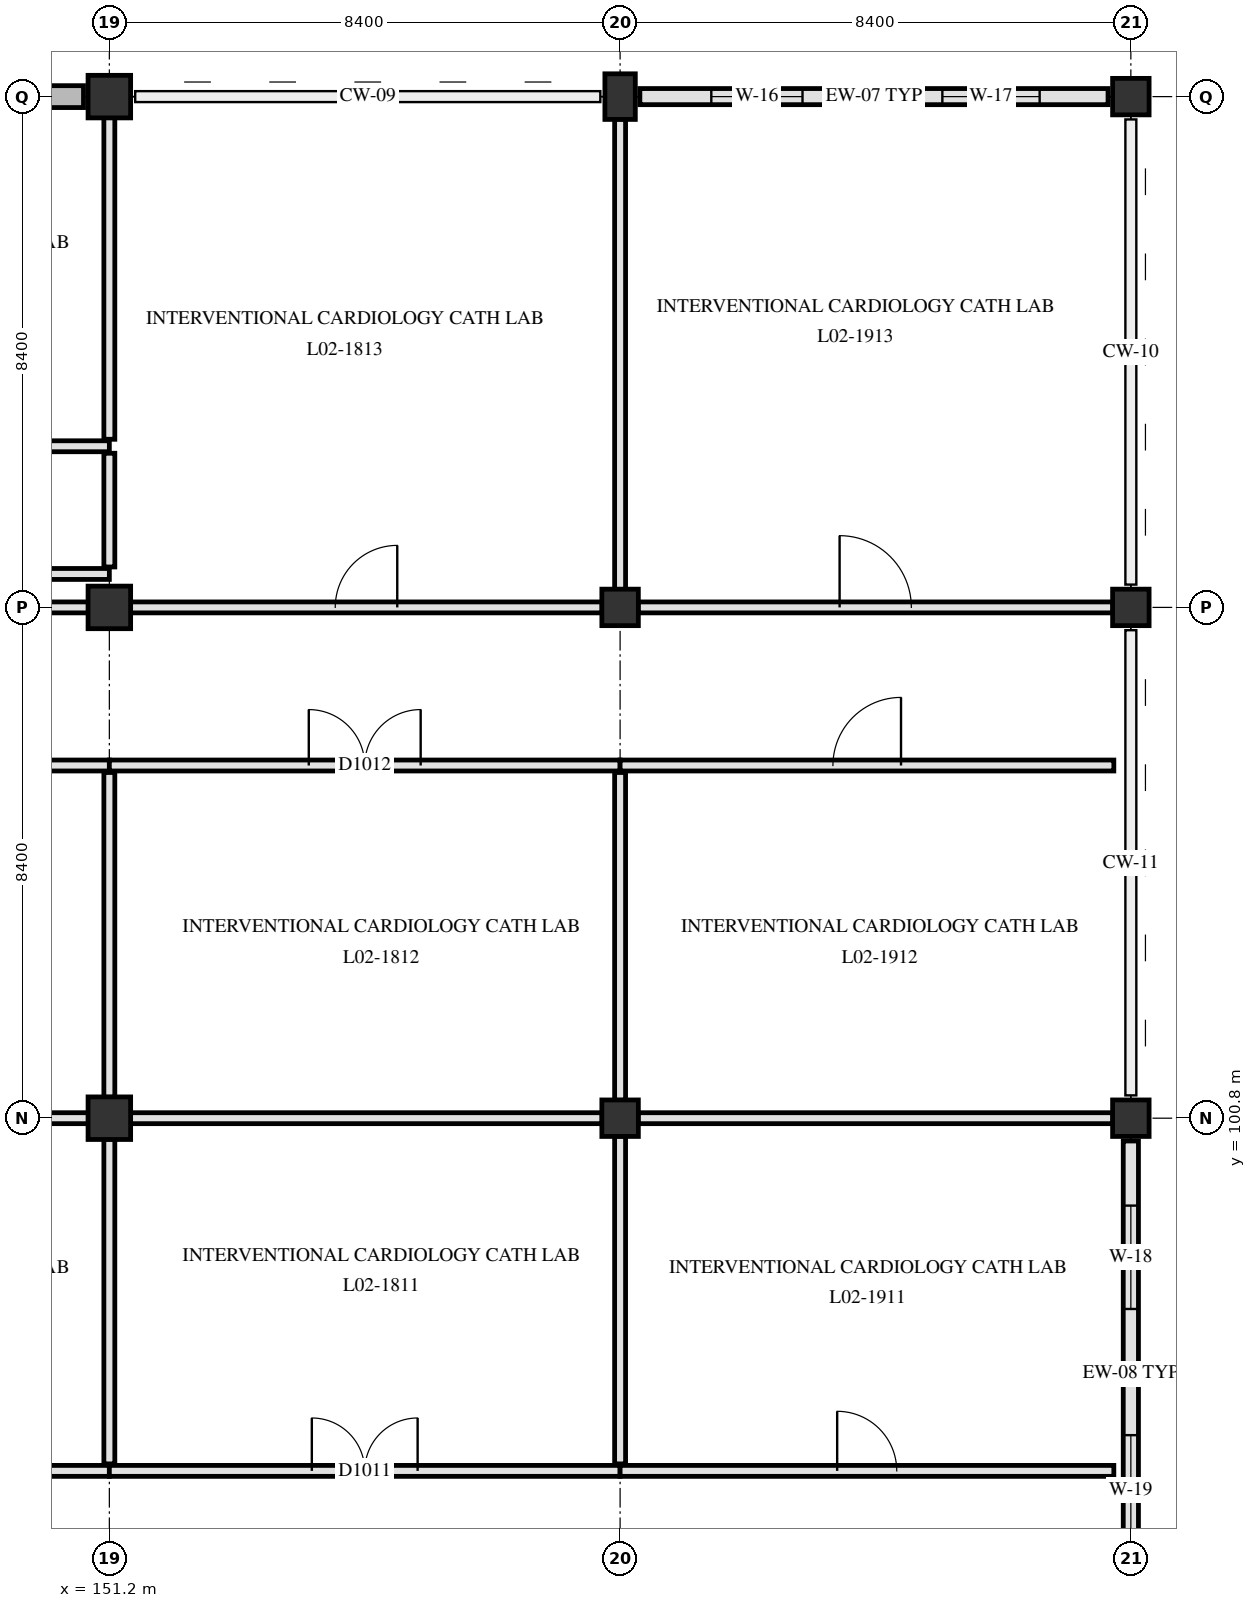
"""IFC4 building model, lengths in metres.
Left out: names, types, materials, properties, quantities, classifications, styles, units other than length and angle.
Written with IfcOpenShell. Run it as: python <this file> out.ifc"""

import sys

from ifc_helpers import new_model, si_unit, direction, frame, frame_2d, origin, origin_2d, place, context, subcontext, project, spatial, rectangle, extrude, element, fill, save


model = new_model("IFC4")
c1 = context("Model", 3, precision=1e-05, world=origin(), true_north=direction((0.0, 1.0)))
c2 = subcontext(c1, "Body", "Model", "MODEL_VIEW")
j1 = project(units=[si_unit("LENGTHUNIT", "METRE"), si_unit("PLANEANGLEUNIT", "RADIAN")], contexts=[c1])
p1 = place(None, origin())
s1 = spatial("IfcSite", under=j1, at=p1, CompositionType="ELEMENT")
p2 = place(p1, origin())
s2 = spatial("IfcBuilding", under=s1, at=p2, CompositionType="ELEMENT")
p3 = place(p2, frame((0.0, 0.0, 9.3)))
s3 = spatial("IfcBuildingStorey", under=s2, at=p3, CompositionType="ELEMENT", Elevation=9.3)
for number, where, z_axis, x_axis in (
    (1, (151.2, 100.8, 0.0), (0.0, 0.0, 1.0), (1.0, 0.0, 0.0)),
    (2, (151.2, 109.2, 0.0), (0.0, 0.0, 1.0), (1.0, 0.0, 0.0)),
    (3, (151.2, 117.6, 0.0), (0.0, 0.0, 1.0), (1.0, 0.0, 0.0)),
):
    element("IfcColumn", number, at=place(p3, frame(where, z_axis=z_axis, x_axis=x_axis)), inside=s3, PredefinedType="COLUMN", context=c2, shape_type="SweptSolid", body=[
        extrude(rectangle(XDim=0.7, YDim=0.7, at=origin_2d()), origin(), (0.0, 0.0, 1.0), 5.1),
    ])
for number, where, z_axis, x_axis in (
    (4, (159.6, 100.8, 0.0), (0.0, 0.0, 1.0), (1.0, 0.0, 0.0)),
    (5, (159.6, 109.2, 0.0), (0.0, 0.0, 1.0), (1.0, 0.0, 0.0)),
):
    element("IfcColumn", number, at=place(p3, frame(where, z_axis=z_axis, x_axis=x_axis)), inside=s3, PredefinedType="COLUMN", context=c2, shape_type="SweptSolid", body=[
        extrude(rectangle(XDim=0.6, YDim=0.6, at=origin_2d()), origin(), (0.0, 0.0, 1.0), 5.1),
    ])
p4 = place(p3, frame((159.6, 117.6, 0.0), z_axis=(0.0, 0.0, 1.0), x_axis=(1.0, 0.0, 0.0)))
e6 = element("IfcColumn", 6, at=p4, inside=s3, PredefinedType="PILASTER", context=c2, shape_type="SweptSolid", body=[
    extrude(rectangle(XDim=0.5, YDim=0.75, at=origin_2d()), origin(), (0.0, 0.0, 1.0), 5.1),
])
for number, where, z_axis, x_axis in (
    (7, (168.0, 100.8, 0.0), (0.0, 0.0, 1.0), (1.0, 0.0, 0.0)),
    (8, (168.0, 109.2, 0.0), (0.0, 0.0, 1.0), (1.0, 0.0, 0.0)),
    (9, (168.0, 117.6, 0.0), (0.0, 0.0, 1.0), (1.0, 0.0, 0.0)),
):
    element("IfcColumn", number, at=place(p3, frame(where, z_axis=z_axis, x_axis=x_axis)), inside=s3, PredefinedType="COLUMN", context=c2, shape_type="SweptSolid", body=[
        extrude(rectangle(XDim=0.6, YDim=0.6, at=origin_2d()), origin(), (0.0, 0.0, 1.0), 5.1),
    ])
p5 = place(p3, frame((143.225, 117.6, 0.0), z_axis=(0.0, 0.0, 1.0), x_axis=(1.0, 0.0, 0.0)))
e10 = element("IfcWall", 10, at=p5, inside=s3, PredefinedType="SOLIDWALL", context=c2, shape_type="SweptSolid", body=[
    extrude(rectangle(XDim=7.55, YDim=0.36, at=frame_2d((3.775, 0.0))), origin(), (0.0, 0.0, 1.0), 4.78),
])
p6 = place(p3, frame((159.925, 117.6, 0.0), z_axis=(0.0, 0.0, 1.0), x_axis=(1.0, 0.0, 0.0)))
e11 = element("IfcWall", 11, at=p6, inside=s3, PredefinedType="SOLIDWALL", context=c2, shape_type="SweptSolid", body=[
    extrude(rectangle(XDim=7.7, YDim=0.265, at=frame_2d((3.85, 0.0))), origin(), (0.0, 0.0, 1.0), 4.07),
])
p7 = place(p6, frame((1.175, 0.0, 0.85)))
e12 = element("IfcOpeningElement", 12, at=p7, cuts=e11, PredefinedType="OPENING", context=c2, shape_type="SweptSolid", body=[
    extrude(rectangle(XDim=1.5, YDim=1.42, at=frame_2d((0.75, 0.71))), frame((0.0, 0.142, 0.0), z_axis=(0.0, -1.0, 0.0), x_axis=(1.0, 0.0, 0.0)), (0.0, 0.0, 1.0), 0.285),
])
p8 = place(p6, frame((4.975, 0.0, 0.85)))
e13 = element("IfcOpeningElement", 13, at=p8, cuts=e11, PredefinedType="OPENING", context=c2, shape_type="SweptSolid", body=[
    extrude(rectangle(XDim=1.6, YDim=1.42, at=frame_2d((0.8, 0.71))), frame((0.0, 0.142, 0.0), z_axis=(0.0, -1.0, 0.0), x_axis=(1.0, 0.0, 0.0)), (0.0, 0.0, 1.0), 0.285),
])
p9 = place(p3, frame((168.0, 100.425, 0.0), z_axis=(0.0, 0.0, 1.0), x_axis=(0.0, -1.0, 0.0)))
e14 = element("IfcWall", 14, at=p9, inside=s3, PredefinedType="SOLIDWALL", context=c2, shape_type="SweptSolid", body=[
    extrude(rectangle(XDim=7.65, YDim=0.25, at=frame_2d((3.825, 0.0))), origin(), (0.0, 0.0, 1.0), 4.07),
])
p10 = place(p9, frame((1.062, 0.0, 0.85)))
e15 = element("IfcOpeningElement", 15, at=p10, cuts=e14, PredefinedType="OPENING", context=c2, shape_type="SweptSolid", body=[
    extrude(rectangle(XDim=1.7, YDim=1.42, at=frame_2d((0.85, 0.71))), frame((0.0, 0.135, 0.0), z_axis=(0.0, -1.0, 0.0), x_axis=(1.0, 0.0, 0.0)), (0.0, 0.0, 1.0), 0.27),
])
p11 = place(p9, frame((4.837, 0.0, 0.85)))
e16 = element("IfcOpeningElement", 16, at=p11, cuts=e14, PredefinedType="OPENING", context=c2, shape_type="SweptSolid", body=[
    extrude(rectangle(XDim=1.8, YDim=1.42, at=frame_2d((0.9, 0.71))), frame((0.0, 0.135, 0.0), z_axis=(0.0, -1.0, 0.0), x_axis=(1.0, 0.0, 0.0)), (0.0, 0.0, 1.0), 0.27),
])
p12 = place(p3, frame((142.8, 95.0, 0.0), z_axis=(0.0, 0.0, 1.0), x_axis=(1.0, 0.0, 0.0)))
e17 = element("IfcWall", 17, at=p12, inside=s3, PredefinedType="PARTITIONING", context=c2, shape_type="SweptSolid", body=[
    extrude(rectangle(XDim=8.4, YDim=0.18, at=frame_2d((4.2, 0.0))), origin(), (0.0, 0.0, 1.0), 4.17),
])
p13 = place(p12, frame((3.625, 0.0, 0.0)))
e18 = element("IfcOpeningElement", 18, at=p13, cuts=e17, PredefinedType="OPENING", context=c2, shape_type="SweptSolid", body=[
    extrude(rectangle(XDim=1.15, YDim=2.15, at=frame_2d((0.575, 1.075))), frame((0.0, 0.1, 0.0), z_axis=(0.0, -1.0, 0.0), x_axis=(1.0, 0.0, 0.0)), (0.0, 0.0, 1.0), 0.2),
])
p14 = place(p3, frame((151.2, 95.0, 0.0), z_axis=(0.0, 0.0, 1.0), x_axis=(1.0, 0.0, 0.0)))
e19 = element("IfcWall", 19, at=p14, inside=s3, PredefinedType="PARTITIONING", context=c2, shape_type="SweptSolid", body=[
    extrude(rectangle(XDim=8.4, YDim=0.18, at=frame_2d((4.2, 0.0))), origin(), (0.0, 0.0, 1.0), 4.17),
])
p15 = place(p14, frame((3.33, 0.0, 0.0)))
e20 = element("IfcOpeningElement", 20, at=p15, cuts=e19, PredefinedType="OPENING", context=c2, shape_type="SweptSolid", body=[
    extrude(rectangle(XDim=1.74, YDim=2.24, at=frame_2d((0.87, 1.12))), frame((0.0, 0.1, 0.0), z_axis=(0.0, -1.0, 0.0), x_axis=(1.0, 0.0, 0.0)), (0.0, 0.0, 1.0), 0.2),
])
p16 = place(p3, frame((159.6, 95.0, 0.0), z_axis=(0.0, 0.0, 1.0), x_axis=(1.0, 0.0, 0.0)))
e21 = element("IfcWall", 21, at=p16, inside=s3, PredefinedType="PARTITIONING", context=c2, shape_type="SweptSolid", body=[
    extrude(rectangle(XDim=8.12, YDim=0.18, at=frame_2d((4.06, 0.0))), origin(), (0.0, 0.0, 1.0), 4.17),
])
p17 = place(p16, frame((3.57, 0.0, 0.0)))
e22 = element("IfcOpeningElement", 22, at=p17, cuts=e21, PredefinedType="OPENING", context=c2, shape_type="SweptSolid", body=[
    extrude(rectangle(XDim=0.98, YDim=2.12, at=frame_2d((0.49, 1.06))), frame((0.0, 0.1, 0.0), z_axis=(0.0, -1.0, 0.0), x_axis=(1.0, 0.0, 0.0)), (0.0, 0.0, 1.0), 0.2),
])
p18 = place(p3, frame((143.145, 100.8, 0.0), z_axis=(0.0, 0.0, 1.0), x_axis=(1.0, 0.0, 0.0)))
e23 = element("IfcWall", 23, at=p18, inside=s3, PredefinedType="PARTITIONING", context=c2, shape_type="SweptSolid", body=[
    extrude(rectangle(XDim=7.71, YDim=0.18, at=frame_2d((3.855, 0.0))), origin(), (0.0, 0.0, 1.0), 4.17),
])
p19 = place(p3, frame((151.545, 100.8, 0.0), z_axis=(0.0, 0.0, 1.0), x_axis=(1.0, 0.0, 0.0)))
e24 = element("IfcWall", 24, at=p19, inside=s3, PredefinedType="PARTITIONING", context=c2, shape_type="SweptSolid", body=[
    extrude(rectangle(XDim=7.76, YDim=0.18, at=frame_2d((3.88, 0.0))), origin(), (0.0, 0.0, 1.0), 4.17),
])
p20 = place(p3, frame((159.895, 100.8, 0.0), z_axis=(0.0, 0.0, 1.0), x_axis=(1.0, 0.0, 0.0)))
e25 = element("IfcWall", 25, at=p20, inside=s3, PredefinedType="PARTITIONING", context=c2, shape_type="SweptSolid", body=[
    extrude(rectangle(XDim=7.81, YDim=0.18, at=frame_2d((3.905, 0.0))), origin(), (0.0, 0.0, 1.0), 4.17),
])
p21 = place(p3, frame((142.8, 106.6, 0.0), z_axis=(0.0, 0.0, 1.0), x_axis=(1.0, 0.0, 0.0)))
e26 = element("IfcWall", 26, at=p21, inside=s3, PredefinedType="PARTITIONING", context=c2, shape_type="SweptSolid", body=[
    extrude(rectangle(XDim=8.4, YDim=0.18, at=frame_2d((4.2, 0.0))), origin(), (0.0, 0.0, 1.0), 4.17),
])
p22 = place(p21, frame((3.6, 0.0, 0.0)))
e27 = element("IfcOpeningElement", 27, at=p22, cuts=e26, PredefinedType="OPENING", context=c2, shape_type="SweptSolid", body=[
    extrude(rectangle(XDim=1.2, YDim=2.15, at=frame_2d((0.6, 1.075))), frame((0.0, 0.1, 0.0), z_axis=(0.0, -1.0, 0.0), x_axis=(1.0, 0.0, 0.0)), (0.0, 0.0, 1.0), 0.2),
])
p23 = place(p3, frame((151.2, 106.6, 0.0), z_axis=(0.0, 0.0, 1.0), x_axis=(1.0, 0.0, 0.0)))
e28 = element("IfcWall", 28, at=p23, inside=s3, PredefinedType="PARTITIONING", context=c2, shape_type="SweptSolid", body=[
    extrude(rectangle(XDim=8.4, YDim=0.18, at=frame_2d((4.2, 0.0))), origin(), (0.0, 0.0, 1.0), 4.17),
])
p24 = place(p23, frame((3.28, 0.0, 0.0)))
e29 = element("IfcOpeningElement", 29, at=p24, cuts=e28, PredefinedType="OPENING", context=c2, shape_type="SweptSolid", body=[
    extrude(rectangle(XDim=1.84, YDim=2.28, at=frame_2d((0.92, 1.14))), frame((0.0, 0.1, 0.0), z_axis=(0.0, -1.0, 0.0), x_axis=(1.0, 0.0, 0.0)), (0.0, 0.0, 1.0), 0.2),
])
p25 = place(p3, frame((159.6, 106.6, 0.0), z_axis=(0.0, 0.0, 1.0), x_axis=(1.0, 0.0, 0.0)))
e30 = element("IfcWall", 30, at=p25, inside=s3, PredefinedType="PARTITIONING", context=c2, shape_type="SweptSolid", body=[
    extrude(rectangle(XDim=8.12, YDim=0.18, at=frame_2d((4.06, 0.0))), origin(), (0.0, 0.0, 1.0), 4.17),
])
p26 = place(p25, frame((3.5, 0.0, 0.0)))
e31 = element("IfcOpeningElement", 31, at=p26, cuts=e30, PredefinedType="OPENING", context=c2, shape_type="SweptSolid", body=[
    extrude(rectangle(XDim=1.12, YDim=2.18, at=frame_2d((0.56, 1.09))), frame((0.0, 0.1, 0.0), z_axis=(0.0, -1.0, 0.0), x_axis=(1.0, 0.0, 0.0)), (0.0, 0.0, 1.0), 0.2),
])
p27 = place(p3, frame((143.145, 109.2, 0.0), z_axis=(0.0, 0.0, 1.0), x_axis=(1.0, 0.0, 0.0)))
e32 = element("IfcWall", 32, at=p27, inside=s3, PredefinedType="PARTITIONING", context=c2, shape_type="SweptSolid", body=[
    extrude(rectangle(XDim=7.71, YDim=0.18, at=frame_2d((3.855, 0.0))), origin(), (0.0, 0.0, 1.0), 4.17),
])
p28 = place(p3, frame((151.545, 109.2, 0.0), z_axis=(0.0, 0.0, 1.0), x_axis=(1.0, 0.0, 0.0)))
e33 = element("IfcWall", 33, at=p28, inside=s3, PredefinedType="PARTITIONING", context=c2, shape_type="SweptSolid", body=[
    extrude(rectangle(XDim=7.76, YDim=0.18, at=frame_2d((3.88, 0.0))), origin(), (0.0, 0.0, 1.0), 4.17),
])
p29 = place(p28, frame((3.37, 0.0, 0.0)))
e34 = element("IfcOpeningElement", 34, at=p29, cuts=e33, PredefinedType="OPENING", context=c2, shape_type="SweptSolid", body=[
    extrude(rectangle(XDim=1.02, YDim=2.12, at=frame_2d((0.51, 1.06))), frame((0.0, 0.1, 0.0), z_axis=(0.0, -1.0, 0.0), x_axis=(1.0, 0.0, 0.0)), (0.0, 0.0, 1.0), 0.2),
])
p30 = place(p3, frame((159.895, 109.2, 0.0), z_axis=(0.0, 0.0, 1.0), x_axis=(1.0, 0.0, 0.0)))
e35 = element("IfcWall", 35, at=p30, inside=s3, PredefinedType="PARTITIONING", context=c2, shape_type="SweptSolid", body=[
    extrude(rectangle(XDim=7.81, YDim=0.18, at=frame_2d((3.905, 0.0))), origin(), (0.0, 0.0, 1.0), 4.17),
])
p31 = place(p30, frame((3.315, 0.0, 0.0)))
e36 = element("IfcOpeningElement", 36, at=p31, cuts=e35, PredefinedType="OPENING", context=c2, shape_type="SweptSolid", body=[
    extrude(rectangle(XDim=1.18, YDim=2.18, at=frame_2d((0.59, 1.09))), frame((0.0, 0.1, 0.0), z_axis=(0.0, -1.0, 0.0), x_axis=(1.0, 0.0, 0.0)), (0.0, 0.0, 1.0), 0.2),
])
p32 = place(p3, frame((142.8, 109.75, 0.0), z_axis=(0.0, 0.0, 1.0), x_axis=(1.0, 0.0, 0.0)))
e37 = element("IfcWall", 37, at=p32, inside=s3, PredefinedType="PARTITIONING", context=c2, shape_type="SweptSolid", body=[
    extrude(rectangle(XDim=8.4, YDim=0.18, at=frame_2d((4.2, 0.0))), origin(), (0.0, 0.0, 1.0), 4.17),
])
p33 = place(p3, frame((142.8, 111.85, 0.0), z_axis=(0.0, 0.0, 1.0), x_axis=(1.0, 0.0, 0.0)))
e38 = element("IfcWall", 38, at=p33, inside=s3, PredefinedType="PARTITIONING", context=c2, shape_type="SweptSolid", body=[
    extrude(rectangle(XDim=8.4, YDim=0.18, at=frame_2d((4.2, 0.0))), origin(), (0.0, 0.0, 1.0), 4.17),
])
p34 = place(p33, frame((3.575, 0.0, 0.0)))
e39 = element("IfcOpeningElement", 39, at=p34, cuts=e38, PredefinedType="OPENING", context=c2, shape_type="SweptSolid", body=[
    extrude(rectangle(XDim=1.25, YDim=2.2, at=frame_2d((0.625, 1.1))), frame((0.0, 0.1, 0.0), z_axis=(0.0, -1.0, 0.0), x_axis=(1.0, 0.0, 0.0)), (0.0, 0.0, 1.0), 0.2),
])
for number, where, z_axis, x_axis in (
    (40, (151.2, 95.115, 0.0), (0.0, 0.0, 1.0), (0.0, 1.0, 0.0)),
    (41, (151.2, 101.145, 0.0), (0.0, 0.0, 1.0), (0.0, 1.0, 0.0)),
):
    element("IfcWall", number, at=place(p3, frame(where, z_axis=z_axis, x_axis=x_axis)), inside=s3, PredefinedType="PARTITIONING", context=c2, shape_type="SweptSolid", body=[
        extrude(rectangle(XDim=5.34, YDim=0.18, at=frame_2d((2.67, 0.0))), origin(), (0.0, 0.0, 1.0), 4.17),
    ])
p35 = place(p3, frame((151.2, 109.865, 0.0), z_axis=(0.0, 0.0, 1.0), x_axis=(0.0, 1.0, 0.0)))
e42 = element("IfcWall", 42, at=p35, inside=s3, PredefinedType="PARTITIONING", context=c2, shape_type="SweptSolid", body=[
    extrude(rectangle(XDim=1.87, YDim=0.18, at=frame_2d((0.935, 0.0))), origin(), (0.0, 0.0, 1.0), 4.17),
])
p36 = place(p3, frame((151.2, 111.965, 0.0), z_axis=(0.0, 0.0, 1.0), x_axis=(0.0, 1.0, 0.0)))
e43 = element("IfcWall", 43, at=p36, inside=s3, PredefinedType="PARTITIONING", context=c2, shape_type="SweptSolid", body=[
    extrude(rectangle(XDim=5.29, YDim=0.18, at=frame_2d((2.645, 0.0))), origin(), (0.0, 0.0, 1.0), 4.17),
])
p37 = place(p3, frame((159.6, 95.115, 0.0), z_axis=(0.0, 0.0, 1.0), x_axis=(0.0, 1.0, 0.0)))
e44 = element("IfcWall", 44, at=p37, inside=s3, PredefinedType="PARTITIONING", context=c2, shape_type="SweptSolid", body=[
    extrude(rectangle(XDim=5.39, YDim=0.18, at=frame_2d((2.695, 0.0))), origin(), (0.0, 0.0, 1.0), 4.17),
])
p38 = place(p3, frame((159.6, 101.095, 0.0), z_axis=(0.0, 0.0, 1.0), x_axis=(0.0, 1.0, 0.0)))
e45 = element("IfcWall", 45, at=p38, inside=s3, PredefinedType="PARTITIONING", context=c2, shape_type="SweptSolid", body=[
    extrude(rectangle(XDim=5.39, YDim=0.18, at=frame_2d((2.695, 0.0))), origin(), (0.0, 0.0, 1.0), 4.17),
])
p39 = place(p3, frame((159.6, 109.495, 0.0), z_axis=(0.0, 0.0, 1.0), x_axis=(0.0, 1.0, 0.0)))
e46 = element("IfcWall", 46, at=p39, inside=s3, PredefinedType="PARTITIONING", context=c2, shape_type="SweptSolid", body=[
    extrude(rectangle(XDim=7.735, YDim=0.18, at=frame_2d((3.867, 0.0))), origin(), (0.0, 0.0, 1.0), 4.17),
])
p40 = place(p7, origin())
e47 = element("IfcWindow", 47, at=p40, inside=s3, PartitioningType="SINGLE_PANEL", PredefinedType="WINDOW", context=c2, shape_type="SweptSolid", body=[
    extrude(rectangle(XDim=1.5, YDim=1.42, at=frame_2d((0.75, 0.71))), frame((0.0, 0.03, 0.0), z_axis=(0.0, -1.0, 0.0), x_axis=(1.0, 0.0, 0.0)), (0.0, 0.0, 1.0), 0.06),
])
fill(e12, e47)
p41 = place(p8, origin())
e48 = element("IfcWindow", 48, at=p41, inside=s3, PartitioningType="SINGLE_PANEL", PredefinedType="WINDOW", context=c2, shape_type="SweptSolid", body=[
    extrude(rectangle(XDim=1.6, YDim=1.42, at=frame_2d((0.8, 0.71))), frame((0.0, 0.03, 0.0), z_axis=(0.0, -1.0, 0.0), x_axis=(1.0, 0.0, 0.0)), (0.0, 0.0, 1.0), 0.06),
])
fill(e13, e48)
p42 = place(p10, origin())
e49 = element("IfcWindow", 49, at=p42, inside=s3, PartitioningType="SINGLE_PANEL", PredefinedType="WINDOW", context=c2, shape_type="SweptSolid", body=[
    extrude(rectangle(XDim=1.7, YDim=1.42, at=frame_2d((0.85, 0.71))), frame((0.0, 0.03, 0.0), z_axis=(0.0, -1.0, 0.0), x_axis=(1.0, 0.0, 0.0)), (0.0, 0.0, 1.0), 0.06),
])
fill(e15, e49)
p43 = place(p11, origin())
e50 = element("IfcWindow", 50, at=p43, inside=s3, PartitioningType="SINGLE_PANEL", PredefinedType="WINDOW", context=c2, shape_type="SweptSolid", body=[
    extrude(rectangle(XDim=1.8, YDim=1.42, at=frame_2d((0.9, 0.71))), frame((0.0, 0.03, 0.0), z_axis=(0.0, -1.0, 0.0), x_axis=(1.0, 0.0, 0.0)), (0.0, 0.0, 1.0), 0.06),
])
fill(e16, e50)
p44 = place(p15, origin())
e51 = element("IfcDoor", 51, at=p44, inside=s3, OperationType="DOUBLE_SWING_RIGHT", PredefinedType="DOOR", context=c2, shape_type="SweptSolid", body=[
    extrude(rectangle(XDim=1.74, YDim=2.24, at=frame_2d((0.87, 1.12))), frame((0.0, 0.025, 0.0), z_axis=(0.0, -1.0, 0.0), x_axis=(1.0, 0.0, 0.0)), (0.0, 0.0, 1.0), 0.05),
])
fill(e20, e51)
p45 = place(p24, origin())
e52 = element("IfcDoor", 52, at=p45, inside=s3, OperationType="DOUBLE_SWING_LEFT", PredefinedType="DOOR", context=c2, shape_type="SweptSolid", body=[
    extrude(rectangle(XDim=1.84, YDim=2.28, at=frame_2d((0.92, 1.14))), frame((0.0, 0.025, 0.0), z_axis=(0.0, -1.0, 0.0), x_axis=(1.0, 0.0, 0.0)), (0.0, 0.0, 1.0), 0.05),
])
fill(e29, e52)
p46 = place(p29, origin())
e53 = element("IfcDoor", 53, at=p46, inside=s3, OperationType="SINGLE_SWING_RIGHT", PredefinedType="DOOR", context=c2, shape_type="SweptSolid", body=[
    extrude(rectangle(XDim=1.02, YDim=2.12, at=frame_2d((0.51, 1.06))), frame((0.0, 0.025, 0.0), z_axis=(0.0, -1.0, 0.0), x_axis=(1.0, 0.0, 0.0)), (0.0, 0.0, 1.0), 0.05),
])
fill(e34, e53)
p47 = place(p17, origin())
e54 = element("IfcDoor", 54, at=p47, inside=s3, OperationType="SINGLE_SWING_LEFT", PredefinedType="DOOR", context=c2, shape_type="SweptSolid", body=[
    extrude(rectangle(XDim=0.98, YDim=2.12, at=frame_2d((0.49, 1.06))), frame((0.0, 0.025, 0.0), z_axis=(0.0, -1.0, 0.0), x_axis=(1.0, 0.0, 0.0)), (0.0, 0.0, 1.0), 0.05),
])
fill(e22, e54)
p48 = place(p26, origin())
e55 = element("IfcDoor", 55, at=p48, inside=s3, OperationType="SINGLE_SWING_RIGHT", PredefinedType="DOOR", context=c2, shape_type="SweptSolid", body=[
    extrude(rectangle(XDim=1.12, YDim=2.18, at=frame_2d((0.56, 1.09))), frame((0.0, 0.025, 0.0), z_axis=(0.0, -1.0, 0.0), x_axis=(1.0, 0.0, 0.0)), (0.0, 0.0, 1.0), 0.05),
])
fill(e31, e55)
p49 = place(p31, origin())
e56 = element("IfcDoor", 56, at=p49, inside=s3, OperationType="SINGLE_SWING_LEFT", PredefinedType="DOOR", context=c2, shape_type="SweptSolid", body=[
    extrude(rectangle(XDim=1.18, YDim=2.18, at=frame_2d((0.59, 1.09))), frame((0.0, 0.025, 0.0), z_axis=(0.0, -1.0, 0.0), x_axis=(1.0, 0.0, 0.0)), (0.0, 0.0, 1.0), 0.05),
])
fill(e36, e56)
save(model, sys.argv[1])
